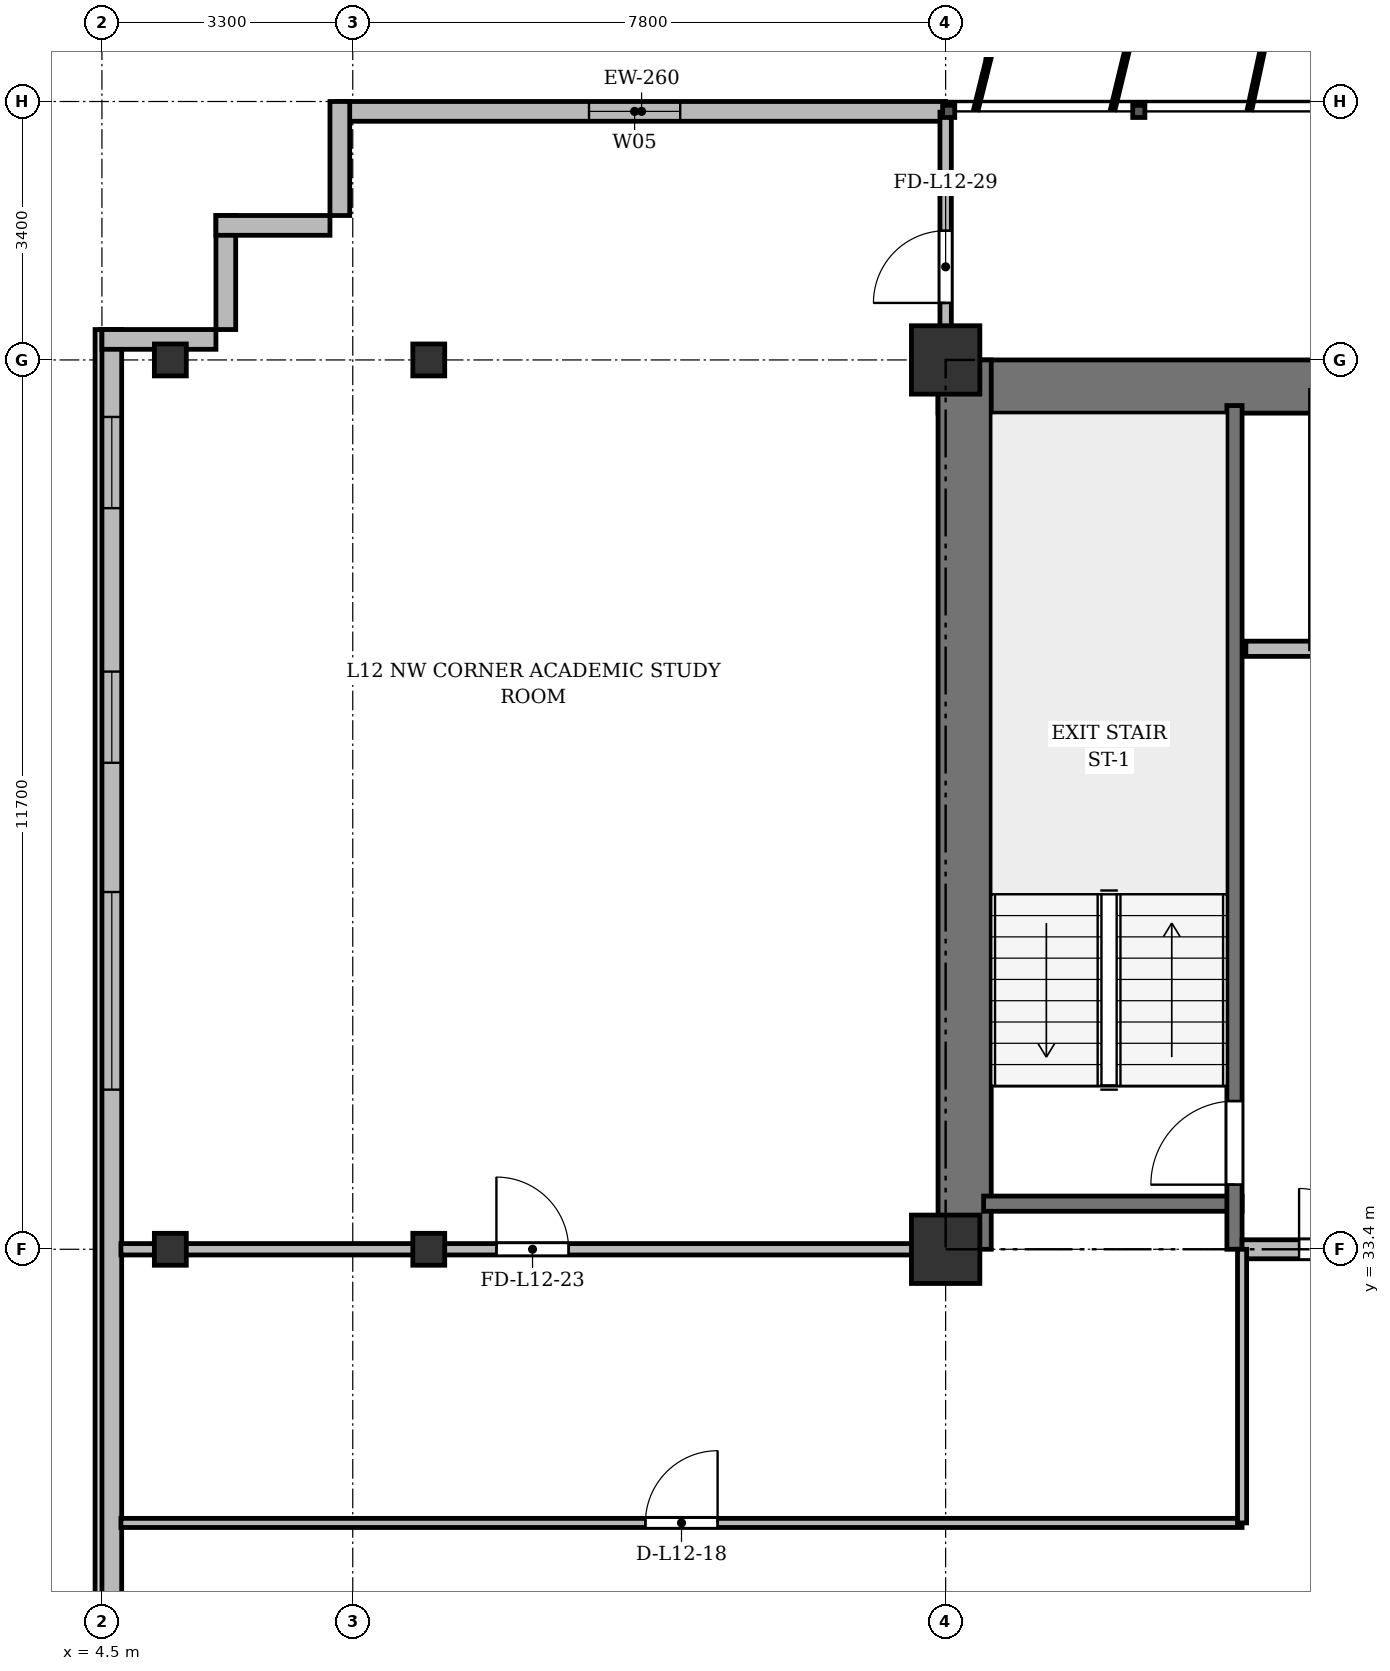
"""IFC4 building model, lengths in metres.
Left out: names, types, materials, properties, quantities, classifications, styles, units other than length and angle.
Written with IfcOpenShell. Run it as: python <this file> out.ifc"""

import sys

from ifc_helpers import new_model, si_unit, direction, frame, frame_2d, origin, origin_2d, place, context, subcontext, project, spatial, rectangle, i_section, extrude, source, transform, mapped, element, fill, save


model = new_model("IFC4")
c1 = context("Model", 3, precision=1e-05, world=origin(), true_north=direction((0.0, 1.0)))
c2 = subcontext(c1, "Body", "Model", "MODEL_VIEW")
j1 = project(units=[si_unit("LENGTHUNIT", "METRE"), si_unit("PLANEANGLEUNIT", "RADIAN")], contexts=[c1])
p1 = place(None, origin())
s1 = spatial("IfcSite", under=j1, at=p1, CompositionType="ELEMENT")
p2 = place(p1, origin())
s2 = spatial("IfcBuilding", under=s1, at=p2, CompositionType="ELEMENT")
p3 = place(p2, frame((0.0, 0.0, 48.7)))
s3 = spatial("IfcBuildingStorey", under=s2, at=p3, CompositionType="ELEMENT", Elevation=48.7)
m1 = source(origin(), c2, "Body", "SweptSolid", [
    extrude(i_section(OverallWidth=0.42, OverallDepth=0.42, WebThickness=0.026, FlangeThickness=0.04, at=origin_2d()), origin(), (0.0, 0.0, 1.0), 3.6),
])
for number, where, z_axis, x_axis in (
    (1, (5.4, 33.4, 0.0), (0.0, 0.0, 1.0), (1.0, 0.0, 0.0)),
    (2, (5.4, 45.1, 0.0), (0.0, 0.0, 1.0), (1.0, 0.0, 0.0)),
    (3, (8.8, 33.4, 0.0), (0.0, 0.0, 1.0), (1.0, 0.0, 0.0)),
    (4, (8.8, 45.1, 0.0), (0.0, 0.0, 1.0), (1.0, 0.0, 0.0)),
):
    element("IfcColumn", number, at=place(p3, frame(where, z_axis=z_axis, x_axis=x_axis)), inside=s3, PredefinedType="COLUMN", context=c2, shape_type="MappedRepresentation", body=[
        mapped(m1, transform((0.0, 0.0, 0.0), x_axis=(1.0, 0.0, 0.0), y_axis=(0.0, 1.0, 0.0), z_axis=(0.0, 0.0, 1.0), scale=1.0)),
    ])
m2 = source(origin(), c2, "Body", "SweptSolid", [
    extrude(rectangle(XDim=0.9, YDim=0.9, at=origin_2d()), origin(), (0.0, 0.0, 1.0), 3.6),
])
for number, where, z_axis, x_axis in (
    (5, (15.6, 33.4, 0.0), (0.0, 0.0, 1.0), (1.0, 0.0, 0.0)),
    (6, (15.6, 45.1, 0.0), (0.0, 0.0, 1.0), (1.0, 0.0, 0.0)),
):
    element("IfcColumn", number, at=place(p3, frame(where, z_axis=z_axis, x_axis=x_axis)), inside=s3, PredefinedType="COLUMN", context=c2, shape_type="MappedRepresentation", body=[
        mapped(m2, transform((0.0, 0.0, 0.0), x_axis=(1.0, 0.0, 0.0), y_axis=(0.0, 1.0, 0.0), z_axis=(0.0, 0.0, 1.0), scale=1.0)),
    ])
p4 = place(p3, frame((7.6, 48.37, 0.0), z_axis=(0.0, 0.0, 1.0), x_axis=(1.0, 0.0, 0.0)))
e7 = element("IfcWall", 7, at=p4, inside=s3, PredefinedType="SOLIDWALL", context=c2, shape_type="SweptSolid", body=[
    extrude(rectangle(XDim=8.0, YDim=0.26, at=frame_2d((4.0, 0.0))), origin(), (0.0, 0.0, 1.0), 3.34),
])
p5 = place(p4, frame((3.308, 0.0, 0.9)))
e8 = element("IfcOpeningElement", 8, at=p5, cuts=e7, PredefinedType="OPENING", context=c2, shape_type="SweptSolid", body=[
    extrude(rectangle(XDim=1.2, YDim=1.65, at=frame_2d((0.6, 0.825))), frame((0.0, 0.14, 0.0), z_axis=(0.0, -1.0, 0.0), x_axis=(1.0, 0.0, 0.0)), (0.0, 0.0, 1.0), 0.28),
])
p6 = place(p3, frame((4.63, 5.9, 0.0), z_axis=(0.0, 0.0, 1.0), x_axis=(0.0, 1.0, 0.0)))
e9 = element("IfcWall", 9, at=p6, inside=s3, PredefinedType="SOLIDWALL", context=c2, shape_type="SweptSolid", body=[
    extrude(rectangle(XDim=39.6, YDim=0.26, at=frame_2d((19.8, 0.0))), origin(), (0.0, 0.0, 1.0), 3.34),
])
p7 = place(p6, frame((1.45, 0.0, 0.92)))
e10 = element("IfcOpeningElement", 10, at=p7, cuts=e9, PredefinedType="OPENING", context=c2, shape_type="SweptSolid", body=[
    extrude(rectangle(XDim=1.2, YDim=1.65, at=frame_2d((0.6, 0.825))), frame((0.0, 0.14, 0.0), z_axis=(0.0, -1.0, 0.0), x_axis=(1.0, 0.0, 0.0)), (0.0, 0.0, 1.0), 0.28),
])
p8 = place(p6, frame((4.2, 0.0, 0.92)))
e11 = element("IfcOpeningElement", 11, at=p8, cuts=e9, PredefinedType="OPENING", context=c2, shape_type="SweptSolid", body=[
    extrude(rectangle(XDim=2.6, YDim=1.9, at=frame_2d((1.3, 0.95))), frame((0.0, 0.14, 0.0), z_axis=(0.0, -1.0, 0.0), x_axis=(1.0, 0.0, 0.0)), (0.0, 0.0, 1.0), 0.28),
])
p9 = place(p6, frame((8.4, 0.0, 0.92)))
e12 = element("IfcOpeningElement", 12, at=p9, cuts=e9, PredefinedType="OPENING", context=c2, shape_type="SweptSolid", body=[
    extrude(rectangle(XDim=2.6, YDim=1.9, at=frame_2d((1.3, 0.95))), frame((0.0, 0.14, 0.0), z_axis=(0.0, -1.0, 0.0), x_axis=(1.0, 0.0, 0.0)), (0.0, 0.0, 1.0), 0.28),
])
p10 = place(p6, frame((29.6, 0.0, 0.92)))
e13 = element("IfcOpeningElement", 13, at=p10, cuts=e9, PredefinedType="OPENING", context=c2, shape_type="SweptSolid", body=[
    extrude(rectangle(XDim=2.6, YDim=1.9, at=frame_2d((1.3, 0.95))), frame((0.0, 0.14, 0.0), z_axis=(0.0, -1.0, 0.0), x_axis=(1.0, 0.0, 0.0)), (0.0, 0.0, 1.0), 0.28),
])
p11 = place(p6, frame((33.9, 0.0, 0.92)))
e14 = element("IfcOpeningElement", 14, at=p11, cuts=e9, PredefinedType="OPENING", context=c2, shape_type="SweptSolid", body=[
    extrude(rectangle(XDim=1.2, YDim=1.65, at=frame_2d((0.6, 0.825))), frame((0.0, 0.14, 0.0), z_axis=(0.0, -1.0, 0.0), x_axis=(1.0, 0.0, 0.0)), (0.0, 0.0, 1.0), 0.28),
])
p12 = place(p6, frame((37.25, 0.0, 0.92)))
e15 = element("IfcOpeningElement", 15, at=p12, cuts=e9, PredefinedType="OPENING", context=c2, shape_type="SweptSolid", body=[
    extrude(rectangle(XDim=1.2, YDim=1.65, at=frame_2d((0.6, 0.825))), frame((0.0, 0.14, 0.0), z_axis=(0.0, -1.0, 0.0), x_axis=(1.0, 0.0, 0.0)), (0.0, 0.0, 1.0), 0.28),
])
p13 = place(p3, frame((4.5, 45.37, 0.0), z_axis=(0.0, 0.0, 1.0), x_axis=(1.0, 0.0, 0.0)))
e16 = element("IfcWall", 16, at=p13, inside=s3, PredefinedType="SOLIDWALL", context=c2, shape_type="SweptSolid", body=[
    extrude(rectangle(XDim=1.5, YDim=0.26, at=frame_2d((0.75, 0.0))), origin(), (0.0, 0.0, 1.0), 2.69),
])
for number, where, z_axis, x_axis in (
    (17, (6.13, 45.5, 0.0), (0.0, 0.0, 1.0), (0.0, 1.0, 0.0)),
    (18, (6.0, 46.87, 0.0), (0.0, 0.0, 1.0), (1.0, 0.0, 0.0)),
    (19, (7.63, 47.0, 0.0), (0.0, 0.0, 1.0), (0.0, 1.0, 0.0)),
):
    element("IfcWall", number, at=place(p3, frame(where, z_axis=z_axis, x_axis=x_axis)), inside=s3, PredefinedType="SOLIDWALL", context=c2, shape_type="SweptSolid", body=[
        extrude(rectangle(XDim=1.5, YDim=0.26, at=frame_2d((0.75, 0.0))), origin(), (0.0, 0.0, 1.0), 3.34),
    ])
p14 = place(p3, frame((15.5, 44.75, 0.0), z_axis=(0.0, 0.0, 1.0), x_axis=(1.0, 0.0, 0.0)))
e20 = element("IfcWall", 20, at=p14, inside=s3, PredefinedType="SHEAR", context=c2, shape_type="SweptSolid", body=[
    extrude(rectangle(XDim=43.4, YDim=0.7, at=frame_2d((21.7, 0.0))), origin(), (0.0, 0.0, 1.0), 3.34),
])
p15 = place(p3, frame((15.85, 33.4, 0.0), z_axis=(0.0, 0.0, 1.0), x_axis=(0.0, 1.0, 0.0)))
e21 = element("IfcWall", 21, at=p15, inside=s3, PredefinedType="SHEAR", context=c2, shape_type="SweptSolid", body=[
    extrude(rectangle(XDim=11.7, YDim=0.7, at=frame_2d((5.85, 0.0))), origin(), (0.0, 0.0, 1.0), 3.34),
])
p16 = place(p3, frame((16.1, 34.0, 0.0), z_axis=(0.0, 0.0, 1.0), x_axis=(1.0, 0.0, 0.0)))
e22 = element("IfcWall", 22, at=p16, inside=s3, PredefinedType="SHEAR", context=c2, shape_type="SweptSolid", body=[
    extrude(rectangle(XDim=3.4, YDim=0.2, at=frame_2d((1.7, 0.0))), origin(), (0.0, 0.0, 1.0), 3.34),
])
p17 = place(p3, frame((19.4, 33.4, 0.0), z_axis=(0.0, 0.0, 1.0), x_axis=(0.0, 1.0, 0.0)))
e23 = element("IfcWall", 23, at=p17, inside=s3, PredefinedType="SHEAR", context=c2, shape_type="SweptSolid", body=[
    extrude(rectangle(XDim=11.1, YDim=0.2, at=frame_2d((5.55, 0.0))), origin(), (0.0, 0.0, 1.0), 3.34),
])
p18 = place(p17, frame((0.85, 0.0, 0.0)))
e24 = element("IfcOpeningElement", 24, at=p18, cuts=e23, PredefinedType="OPENING", context=c2, shape_type="SweptSolid", body=[
    extrude(rectangle(XDim=1.1, YDim=2.15, at=frame_2d((0.55, 1.075))), frame((0.0, 0.11, 0.0), z_axis=(0.0, -1.0, 0.0), x_axis=(1.0, 0.0, 0.0)), (0.0, 0.0, 1.0), 0.22),
])
p19 = place(p3, frame((19.55, 41.3, 0.0), z_axis=(0.0, 0.0, 1.0), x_axis=(1.0, 0.0, 0.0)))
e25 = element("IfcWall", 25, at=p19, inside=s3, PredefinedType="SOLIDWALL", context=c2, shape_type="SweptSolid", body=[
    extrude(rectangle(XDim=6.75, YDim=0.2, at=frame_2d((3.375, 0.0))), origin(), (0.0, 0.0, 1.0), 3.34),
])
p20 = place(p19, frame((1.7, 0.0, 0.0)))
e26 = element("IfcOpeningElement", 26, at=p20, cuts=e25, PredefinedType="OPENING", context=c2, shape_type="SweptSolid", body=[
    extrude(rectangle(XDim=1.1, YDim=2.15, at=frame_2d((0.55, 1.075))), frame((0.0, 0.11, 0.0), z_axis=(0.0, -1.0, 0.0), x_axis=(1.0, 0.0, 0.0)), (0.0, 0.0, 1.0), 0.22),
])
p21 = place(p19, frame((4.4, 0.0, 0.0)))
e27 = element("IfcOpeningElement", 27, at=p21, cuts=e25, PredefinedType="OPENING", context=c2, shape_type="SweptSolid", body=[
    extrude(rectangle(XDim=1.1, YDim=2.15, at=frame_2d((0.55, 1.075))), frame((0.0, 0.11, 0.0), z_axis=(0.0, -1.0, 0.0), x_axis=(1.0, 0.0, 0.0)), (0.0, 0.0, 1.0), 0.22),
])
p22 = place(p3, frame((19.5, 33.4, 0.0), z_axis=(0.0, 0.0, 1.0), x_axis=(1.0, 0.0, 0.0)))
e28 = element("IfcWall", 28, at=p22, inside=s3, PredefinedType="PARTITIONING", context=c2, shape_type="SweptSolid", body=[
    extrude(rectangle(XDim=6.8, YDim=0.25, at=frame_2d((3.4, 0.0))), origin(), (0.0, 0.0, 1.0), 2.69),
])
p23 = place(p22, frame((0.75, 0.0, 0.0)))
e29 = element("IfcOpeningElement", 29, at=p23, cuts=e28, PredefinedType="OPENING", context=c2, shape_type="SweptSolid", body=[
    extrude(rectangle(XDim=1.6, YDim=2.2, at=frame_2d((0.8, 1.1))), frame((0.0, 0.135, 0.0), z_axis=(0.0, -1.0, 0.0), x_axis=(1.0, 0.0, 0.0)), (0.0, 0.0, 1.0), 0.27),
])
p24 = place(p3, frame((4.75, 29.8, 0.0), z_axis=(0.0, 0.0, 1.0), x_axis=(1.0, 0.0, 0.0)))
e30 = element("IfcWall", 30, at=p24, inside=s3, PredefinedType="PARTITIONING", context=c2, shape_type="SweptSolid", body=[
    extrude(rectangle(XDim=14.75, YDim=0.12, at=frame_2d((7.375, 0.0))), origin(), (0.0, 0.0, 1.0), 2.752),
])
p25 = place(p24, frame((6.9, 0.0, 0.0)))
e31 = element("IfcOpeningElement", 31, at=p25, cuts=e30, PredefinedType="OPENING", context=c2, shape_type="SweptSolid", body=[
    extrude(rectangle(XDim=0.95, YDim=2.15, at=frame_2d((0.475, 1.075))), frame((0.0, 0.07, 0.0), z_axis=(0.0, -1.0, 0.0), x_axis=(1.0, 0.0, 0.0)), (0.0, 0.0, 1.0), 0.14),
])
p26 = place(p3, frame((19.5, 29.8, 0.0), z_axis=(0.0, 0.0, 1.0), x_axis=(0.0, 1.0, 0.0)))
e32 = element("IfcWall", 32, at=p26, inside=s3, PredefinedType="PARTITIONING", context=c2, shape_type="SweptSolid", body=[
    extrude(rectangle(XDim=3.6, YDim=0.12, at=frame_2d((1.8, 0.0))), origin(), (0.0, 0.0, 1.0), 2.69),
])
p27 = place(p3, frame((4.75, 33.4, 0.0), z_axis=(0.0, 0.0, 1.0), x_axis=(1.0, 0.0, 0.0)))
e33 = element("IfcWall", 33, at=p27, inside=s3, PredefinedType="PARTITIONING", context=c2, shape_type="SweptSolid", body=[
    extrude(rectangle(XDim=10.85, YDim=0.15, at=frame_2d((5.425, 0.0))), origin(), (0.0, 0.0, 1.0), 2.69),
])
p28 = place(p27, frame((4.94, 0.0, 0.0)))
e34 = element("IfcOpeningElement", 34, at=p28, cuts=e33, PredefinedType="OPENING", context=c2, shape_type="SweptSolid", body=[
    extrude(rectangle(XDim=0.95, YDim=2.15, at=frame_2d((0.475, 1.075))), frame((0.0, 0.085, 0.0), z_axis=(0.0, -1.0, 0.0), x_axis=(1.0, 0.0, 0.0)), (0.0, 0.0, 1.0), 0.17),
])
p29 = place(p3, frame((15.6, 44.75, 0.0), z_axis=(0.0, 0.0, 1.0), x_axis=(0.0, 1.0, 0.0)))
e35 = element("IfcWall", 35, at=p29, inside=s3, PredefinedType="PARTITIONING", context=c2, shape_type="SweptSolid", body=[
    extrude(rectangle(XDim=3.61, YDim=0.15, at=frame_2d((1.805, 0.0))), origin(), (0.0, 0.0, 1.0), 2.752),
])
p30 = place(p29, frame((1.1, 0.0, 0.0)))
e36 = element("IfcOpeningElement", 36, at=p30, cuts=e35, PredefinedType="OPENING", context=c2, shape_type="SweptSolid", body=[
    extrude(rectangle(XDim=0.95, YDim=2.15, at=frame_2d((0.475, 1.075))), frame((0.0, 0.085, 0.0), z_axis=(0.0, -1.0, 0.0), x_axis=(1.0, 0.0, 0.0)), (0.0, 0.0, 1.0), 0.17),
])
m3 = source(origin(), c2, "Body", "SweptSolid", [
    extrude(rectangle(XDim=1.2, YDim=1.65, at=frame_2d((0.6, 0.825))), frame((0.0, 0.03, 0.0), z_axis=(0.0, -1.0, 0.0), x_axis=(1.0, 0.0, 0.0)), (0.0, 0.0, 1.0), 0.06),
])
p31 = place(p5, origin())
e37 = element("IfcWindow", 37, at=p31, inside=s3, PartitioningType="SINGLE_PANEL", PredefinedType="WINDOW", context=c2, shape_type="MappedRepresentation", body=[
    mapped(m3, transform((0.0, 0.0, 0.0), x_axis=(1.0, 0.0, 0.0), y_axis=(0.0, 1.0, 0.0), z_axis=(0.0, 0.0, 1.0), scale=1.0)),
])
fill(e8, e37)
m4 = source(origin(), c2, "Body", "SweptSolid", [
    extrude(rectangle(XDim=2.6, YDim=1.9, at=frame_2d((1.3, 0.95))), frame((0.0, 0.03, 0.0), z_axis=(0.0, -1.0, 0.0), x_axis=(1.0, 0.0, 0.0)), (0.0, 0.0, 1.0), 0.06),
])
p32 = place(p10, origin())
e38 = element("IfcWindow", 38, at=p32, inside=s3, PartitioningType="SINGLE_PANEL", PredefinedType="WINDOW", context=c2, shape_type="MappedRepresentation", body=[
    mapped(m4, transform((0.0, 0.0, 0.0), x_axis=(1.0, 0.0, 0.0), y_axis=(0.0, 1.0, 0.0), z_axis=(0.0, 0.0, 1.0), scale=1.0)),
])
fill(e13, e38)
p33 = place(p11, origin())
e39 = element("IfcWindow", 39, at=p33, inside=s3, PartitioningType="SINGLE_PANEL", PredefinedType="WINDOW", context=c2, shape_type="MappedRepresentation", body=[
    mapped(m3, transform((0.0, 0.0, 0.0), x_axis=(1.0, 0.0, 0.0), y_axis=(0.0, 1.0, 0.0), z_axis=(0.0, 0.0, 1.0), scale=1.0)),
])
fill(e14, e39)
p34 = place(p12, origin())
e40 = element("IfcWindow", 40, at=p34, inside=s3, PartitioningType="SINGLE_PANEL", PredefinedType="WINDOW", context=c2, shape_type="MappedRepresentation", body=[
    mapped(m3, transform((0.0, 0.0, 0.0), x_axis=(1.0, 0.0, 0.0), y_axis=(0.0, 1.0, 0.0), z_axis=(0.0, 0.0, 1.0), scale=1.0)),
])
fill(e15, e40)
m5 = source(origin(), c2, "Body", "SweptSolid", [
    extrude(rectangle(XDim=1.1, YDim=2.15, at=frame_2d((0.55, 1.075))), frame((0.0, 0.025, 0.0), z_axis=(0.0, -1.0, 0.0), x_axis=(1.0, 0.0, 0.0)), (0.0, 0.0, 1.0), 0.05),
])
p35 = place(p18, origin())
e41 = element("IfcDoor", 41, at=p35, inside=s3, OperationType="SINGLE_SWING_LEFT", PredefinedType="DOOR", context=c2, shape_type="MappedRepresentation", body=[
    mapped(m5, transform((0.0, 0.0, 0.0), x_axis=(1.0, 0.0, 0.0), y_axis=(0.0, 1.0, 0.0), z_axis=(0.0, 0.0, 1.0), scale=1.0)),
])
fill(e24, e41)
m6 = source(origin(), c2, "Body", "SweptSolid", [
    extrude(rectangle(XDim=1.6, YDim=2.2, at=frame_2d((0.8, 1.1))), frame((0.0, 0.025, 0.0), z_axis=(0.0, -1.0, 0.0), x_axis=(1.0, 0.0, 0.0)), (0.0, 0.0, 1.0), 0.05),
])
p36 = place(p23, origin())
e42 = element("IfcDoor", 42, at=p36, inside=s3, OperationType="DOUBLE_DOOR_SINGLE_SWING", PredefinedType="DOOR", context=c2, shape_type="MappedRepresentation", body=[
    mapped(m6, transform((0.0, 0.0, 0.0), x_axis=(1.0, 0.0, 0.0), y_axis=(0.0, 1.0, 0.0), z_axis=(0.0, 0.0, 1.0), scale=1.0)),
])
fill(e29, e42)
m7 = source(origin(), c2, "Body", "SweptSolid", [
    extrude(rectangle(XDim=0.95, YDim=2.15, at=frame_2d((0.475, 1.075))), frame((0.0, 0.025, 0.0), z_axis=(0.0, -1.0, 0.0), x_axis=(1.0, 0.0, 0.0)), (0.0, 0.0, 1.0), 0.05),
])
p37 = place(p25, origin())
e43 = element("IfcDoor", 43, at=p37, inside=s3, OperationType="SINGLE_SWING_RIGHT", PredefinedType="DOOR", context=c2, shape_type="MappedRepresentation", body=[
    mapped(m7, transform((0.0, 0.0, 0.0), x_axis=(1.0, 0.0, 0.0), y_axis=(0.0, 1.0, 0.0), z_axis=(0.0, 0.0, 1.0), scale=1.0)),
])
fill(e31, e43)
p38 = place(p28, origin())
e44 = element("IfcDoor", 44, at=p38, inside=s3, OperationType="SINGLE_SWING_LEFT", PredefinedType="DOOR", context=c2, shape_type="MappedRepresentation", body=[
    mapped(m7, transform((0.0, 0.0, 0.0), x_axis=(1.0, 0.0, 0.0), y_axis=(0.0, 1.0, 0.0), z_axis=(0.0, 0.0, 1.0), scale=1.0)),
])
fill(e34, e44)
p39 = place(p30, origin())
e45 = element("IfcDoor", 45, at=p39, inside=s3, OperationType="SINGLE_SWING_LEFT", PredefinedType="DOOR", context=c2, shape_type="MappedRepresentation", body=[
    mapped(m7, transform((0.0, 0.0, 0.0), x_axis=(1.0, 0.0, 0.0), y_axis=(0.0, 1.0, 0.0), z_axis=(0.0, 0.0, 1.0), scale=1.0)),
])
fill(e36, e45)
save(model, sys.argv[1])
